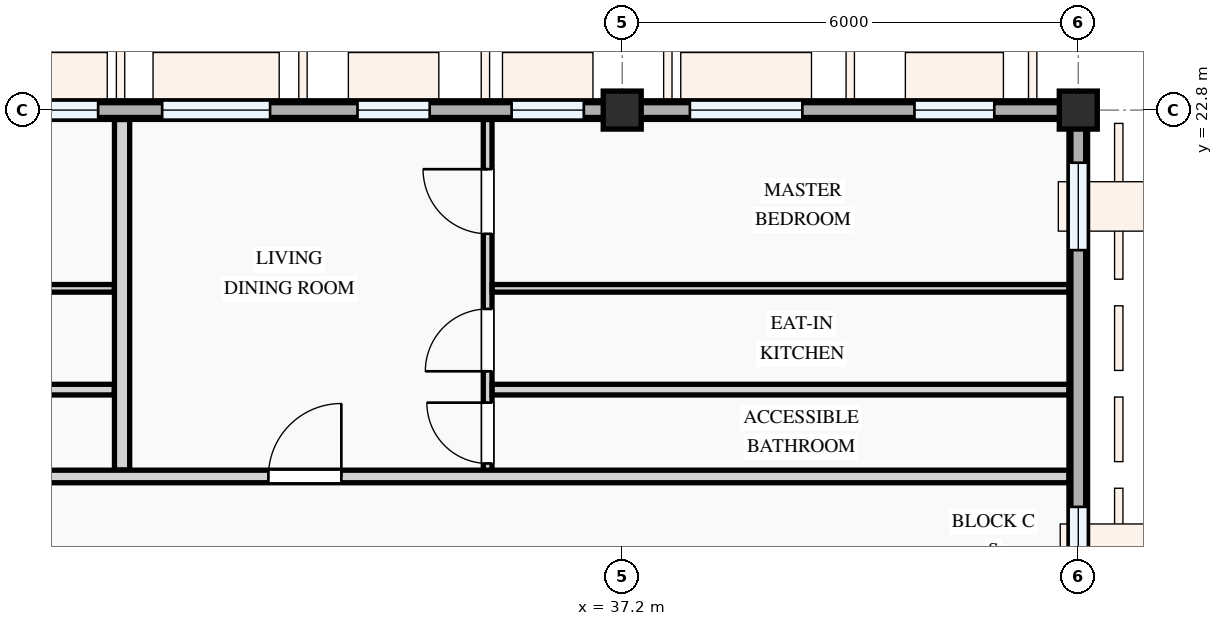
"""IFC4 building model, lengths in metres.
Left out: names, types, materials, properties, quantities, classifications, styles, units other than length and angle.
Written with IfcOpenShell. Run it as: python <this file> out.ifc"""

import sys

from ifc_helpers import new_model, si_unit, direction, frame, frame_2d, origin, origin_2d, place, context, subcontext, project, spatial, rectangle, extrude, element, fill, save


model = new_model("IFC4")
c1 = context("Model", 3, precision=1e-05, world=origin(), true_north=direction((0.0, 1.0)))
c2 = subcontext(c1, "Body", "Model", "MODEL_VIEW")
j1 = project(units=[si_unit("LENGTHUNIT", "METRE"), si_unit("PLANEANGLEUNIT", "RADIAN")], contexts=[c1])
p1 = place(None, origin())
s1 = spatial("IfcSite", under=j1, at=p1, CompositionType="ELEMENT")
p2 = place(p1, origin())
s2 = spatial("IfcBuilding", under=s1, at=p2, CompositionType="ELEMENT")
p3 = place(p2, frame((0.0, 0.0, 34.5)))
s3 = spatial("IfcBuildingStorey", under=s2, at=p3, CompositionType="ELEMENT", Elevation=34.5)
for number, where, z_axis, x_axis in (
    (1, (37.2, 22.8, 0.0), (0.0, 0.0, 1.0), (1.0, 0.0, 0.0)),
    (2, (43.2, 22.8, 0.0), (0.0, 0.0, 1.0), (1.0, 0.0, 0.0)),
):
    element("IfcColumn", number, at=place(p3, frame(where, z_axis=z_axis, x_axis=x_axis)), inside=s3, PredefinedType="COLUMN", context=c2, shape_type="SweptSolid", body=[
        extrude(rectangle(XDim=0.5, YDim=0.5, at=origin_2d()), origin(), (0.0, 0.0, 1.0), 3.3),
    ])
p4 = place(p3, frame((43.2, 14.4, 0.0), z_axis=(0.0, 0.0, 1.0), x_axis=(0.0, 1.0, 0.0)))
e3 = element("IfcWall", 3, at=p4, inside=s3, PredefinedType="STANDARD", context=c2, shape_type="SweptSolid", body=[
    extrude(rectangle(XDim=8.4, YDim=0.245, at=frame_2d((4.2, 0.0))), origin(), (0.0, 0.0, 1.0), 2.425),
])
p5 = place(p4, frame((0.485, 0.0, 0.78)))
e4 = element("IfcOpeningElement", 4, at=p5, cuts=e3, PredefinedType="OPENING", context=c2, shape_type="SweptSolid", body=[
    extrude(rectangle(XDim=0.9, YDim=1.2, at=frame_2d((0.45, 0.6))), frame((0.0, 0.133, 0.0), z_axis=(0.0, -1.0, 0.0), x_axis=(1.0, 0.0, 0.0)), (0.0, 0.0, 1.0), 0.265),
])
p6 = place(p4, frame((2.08, 0.0, 0.78)))
e5 = element("IfcOpeningElement", 5, at=p6, cuts=e3, PredefinedType="OPENING", context=c2, shape_type="SweptSolid", body=[
    extrude(rectangle(XDim=1.1, YDim=1.3, at=frame_2d((0.55, 0.65))), frame((0.0, 0.133, 0.0), z_axis=(0.0, -1.0, 0.0), x_axis=(1.0, 0.0, 0.0)), (0.0, 0.0, 1.0), 0.265),
])
p7 = place(p4, frame((6.558, 0.0, 0.78)))
e6 = element("IfcOpeningElement", 6, at=p7, cuts=e3, PredefinedType="OPENING", context=c2, shape_type="SweptSolid", body=[
    extrude(rectangle(XDim=1.15, YDim=1.25, at=frame_2d((0.575, 0.625))), frame((0.0, 0.133, 0.0), z_axis=(0.0, -1.0, 0.0), x_axis=(1.0, 0.0, 0.0)), (0.0, 0.0, 1.0), 0.265),
])
p8 = place(p3, frame((43.2, 22.8, 0.0), z_axis=(0.0, 0.0, 1.0), x_axis=(-1.0, 0.0, 0.0)))
e7 = element("IfcWall", 7, at=p8, inside=s3, PredefinedType="STANDARD", context=c2, shape_type="SweptSolid", body=[
    extrude(rectangle(XDim=6.0, YDim=0.245, at=frame_2d((3.0, 0.0))), origin(), (0.0, 0.0, 1.0), 2.525),
])
p9 = place(p8, frame((1.105, 0.0, 0.78)))
e8 = element("IfcOpeningElement", 8, at=p9, cuts=e7, PredefinedType="OPENING", context=c2, shape_type="SweptSolid", body=[
    extrude(rectangle(XDim=1.05, YDim=1.2, at=frame_2d((0.525, 0.6))), frame((0.0, 0.133, 0.0), z_axis=(0.0, -1.0, 0.0), x_axis=(1.0, 0.0, 0.0)), (0.0, 0.0, 1.0), 0.265),
])
p10 = place(p8, frame((3.63, 0.0, 0.78)))
e9 = element("IfcOpeningElement", 9, at=p10, cuts=e7, PredefinedType="OPENING", context=c2, shape_type="SweptSolid", body=[
    extrude(rectangle(XDim=1.48, YDim=1.52, at=frame_2d((0.74, 0.76))), frame((0.0, 0.133, 0.0), z_axis=(0.0, -1.0, 0.0), x_axis=(1.0, 0.0, 0.0)), (0.0, 0.0, 1.0), 0.265),
])
p11 = place(p3, frame((37.2, 22.8, 0.0), z_axis=(0.0, 0.0, 1.0), x_axis=(-1.0, 0.0, 0.0)))
e10 = element("IfcWall", 10, at=p11, inside=s3, PredefinedType="STANDARD", context=c2, shape_type="SweptSolid", body=[
    extrude(rectangle(XDim=8.4, YDim=0.245, at=frame_2d((4.2, 0.0))), origin(), (0.0, 0.0, 1.0), 2.375),
])
p12 = place(p11, frame((0.505, 0.0, 0.78)))
e11 = element("IfcOpeningElement", 11, at=p12, cuts=e10, PredefinedType="OPENING", context=c2, shape_type="SweptSolid", body=[
    extrude(rectangle(XDim=0.95, YDim=1.15, at=frame_2d((0.475, 0.575))), frame((0.0, 0.133, 0.0), z_axis=(0.0, -1.0, 0.0), x_axis=(1.0, 0.0, 0.0)), (0.0, 0.0, 1.0), 0.265),
])
p13 = place(p11, frame((2.533, 0.0, 0.78)))
e12 = element("IfcOpeningElement", 12, at=p13, cuts=e10, PredefinedType="OPENING", context=c2, shape_type="SweptSolid", body=[
    extrude(rectangle(XDim=0.95, YDim=1.15, at=frame_2d((0.475, 0.575))), frame((0.0, 0.133, 0.0), z_axis=(0.0, -1.0, 0.0), x_axis=(1.0, 0.0, 0.0)), (0.0, 0.0, 1.0), 0.265),
])
p14 = place(p11, frame((4.633, 0.0, 0.78)))
e13 = element("IfcOpeningElement", 13, at=p14, cuts=e10, PredefinedType="OPENING", context=c2, shape_type="SweptSolid", body=[
    extrude(rectangle(XDim=1.42, YDim=1.38, at=frame_2d((0.71, 0.69))), frame((0.0, 0.133, 0.0), z_axis=(0.0, -1.0, 0.0), x_axis=(1.0, 0.0, 0.0)), (0.0, 0.0, 1.0), 0.265),
])
p15 = place(p11, frame((6.895, 0.0, 0.78)))
e14 = element("IfcOpeningElement", 14, at=p15, cuts=e10, PredefinedType="OPENING", context=c2, shape_type="SweptSolid", body=[
    extrude(rectangle(XDim=1.0, YDim=1.25, at=frame_2d((0.5, 0.625))), frame((0.0, 0.133, 0.0), z_axis=(0.0, -1.0, 0.0), x_axis=(1.0, 0.0, 0.0)), (0.0, 0.0, 1.0), 0.265),
])
p16 = place(p3, frame((43.2, 8.4, 3.3), z_axis=(0.0, 0.0, 1.0), x_axis=(0.0, 1.0, 0.0)))
e15 = element("IfcWall", 15, at=p16, inside=s3, PredefinedType="PARAPET", context=c2, shape_type="SweptSolid", body=[
    extrude(rectangle(XDim=14.4, YDim=0.195, at=frame_2d((7.2, 0.0))), origin(), (0.0, 0.0, 1.0), 1.15),
])
p17 = place(p3, frame((43.2, 22.8, 3.3), z_axis=(0.0, 0.0, 1.0), x_axis=(-1.0, 0.0, 0.0)))
e16 = element("IfcWall", 16, at=p17, inside=s3, PredefinedType="PARAPET", context=c2, shape_type="SweptSolid", body=[
    extrude(rectangle(XDim=20.4, YDim=0.195, at=frame_2d((10.2, 0.0))), origin(), (0.0, 0.0, 1.0), 1.15),
])
p18 = place(p3, frame((26.54, 20.455, 0.0), z_axis=(0.0, 0.0, 1.0), x_axis=(1.0, 0.0, 0.0)))
e17 = element("IfcWall", 17, at=p18, inside=s3, PredefinedType="PARTITIONING", context=c2, shape_type="SweptSolid", body=[
    extrude(rectangle(XDim=3.978, YDim=0.1, at=frame_2d((1.989, 0.0))), origin(), (0.0, 0.0, 1.0), 3.0),
])
p19 = place(p3, frame((26.54, 19.122, 0.0), z_axis=(0.0, 0.0, 1.0), x_axis=(1.0, 0.0, 0.0)))
e18 = element("IfcWall", 18, at=p19, inside=s3, PredefinedType="PARTITIONING", context=c2, shape_type="SweptSolid", body=[
    extrude(rectangle(XDim=3.978, YDim=0.14, at=frame_2d((1.989, 0.0))), origin(), (0.0, 0.0, 1.0), 3.0),
])
p20 = place(p3, frame((35.43, 17.98, 0.0), z_axis=(0.0, 0.0, 1.0), x_axis=(0.0, 1.0, 0.0)))
e19 = element("IfcWall", 19, at=p20, inside=s3, PredefinedType="PARTITIONING", context=c2, shape_type="SweptSolid", body=[
    extrude(rectangle(XDim=4.696, YDim=0.115, at=frame_2d((2.348, 0.0))), origin(), (0.0, 0.0, 1.0), 3.0),
])
p21 = place(p20, frame((0.171, 0.0, 0.0)))
e20 = element("IfcOpeningElement", 20, at=p21, cuts=e19, PredefinedType="OPENING", context=c2, shape_type="SweptSolid", body=[
    extrude(rectangle(XDim=0.8, YDim=2.1, at=frame_2d((0.4, 1.05))), frame((0.0, 0.067, 0.0), z_axis=(0.0, -1.0, 0.0), x_axis=(1.0, 0.0, 0.0)), (0.0, 0.0, 1.0), 0.135),
])
p22 = place(p20, frame((1.384, 0.0, 0.0)))
e21 = element("IfcOpeningElement", 21, at=p22, cuts=e19, PredefinedType="OPENING", context=c2, shape_type="SweptSolid", body=[
    extrude(rectangle(XDim=0.82, YDim=2.08, at=frame_2d((0.41, 1.04))), frame((0.0, 0.067, 0.0), z_axis=(0.0, -1.0, 0.0), x_axis=(1.0, 0.0, 0.0)), (0.0, 0.0, 1.0), 0.135),
])
p23 = place(p20, frame((3.193, 0.0, 0.0)))
e22 = element("IfcOpeningElement", 22, at=p23, cuts=e19, PredefinedType="OPENING", context=c2, shape_type="SweptSolid", body=[
    extrude(rectangle(XDim=0.85, YDim=2.1, at=frame_2d((0.425, 1.05))), frame((0.0, 0.067, 0.0), z_axis=(0.0, -1.0, 0.0), x_axis=(1.0, 0.0, 0.0)), (0.0, 0.0, 1.0), 0.135),
])
p24 = place(p3, frame((35.489, 20.455, 0.0), z_axis=(0.0, 0.0, 1.0), x_axis=(1.0, 0.0, 0.0)))
e23 = element("IfcWall", 23, at=p24, inside=s3, PredefinedType="PARTITIONING", context=c2, shape_type="SweptSolid", body=[
    extrude(rectangle(XDim=7.586, YDim=0.1, at=frame_2d((3.793, 0.0))), origin(), (0.0, 0.0, 1.0), 3.0),
])
p25 = place(p3, frame((35.489, 19.122, 0.0), z_axis=(0.0, 0.0, 1.0), x_axis=(1.0, 0.0, 0.0)))
e24 = element("IfcWall", 24, at=p25, inside=s3, PredefinedType="PARTITIONING", context=c2, shape_type="SweptSolid", body=[
    extrude(rectangle(XDim=7.586, YDim=0.14, at=frame_2d((3.793, 0.0))), origin(), (0.0, 0.0, 1.0), 3.0),
])
p26 = place(p3, frame((30.62, 18.064, 0.0), z_axis=(0.0, 0.0, 1.0), x_axis=(0.0, 1.0, 0.0)))
e25 = element("IfcWall", 25, at=p26, inside=s3, PredefinedType="PARTITIONING", context=c2, shape_type="SweptSolid", body=[
    extrude(rectangle(XDim=4.611, YDim=0.2, at=frame_2d((2.306, 0.0))), origin(), (0.0, 0.0, 1.0), 3.0),
])
p27 = place(p3, frame((22.66, 17.98, 0.0), z_axis=(0.0, 0.0, 1.0), x_axis=(1.0, 0.0, 0.0)))
e26 = element("IfcWall", 26, at=p27, inside=s3, PredefinedType="PARTITIONING", context=c2, shape_type="SweptSolid", body=[
    extrude(rectangle(XDim=20.416, YDim=0.165, at=frame_2d((10.208, 0.0))), origin(), (0.0, 0.0, 1.0), 3.0),
])
p28 = place(p27, frame((2.611, 0.0, 0.0)))
e27 = element("IfcOpeningElement", 27, at=p28, cuts=e26, PredefinedType="OPENING", context=c2, shape_type="SweptSolid", body=[
    extrude(rectangle(XDim=0.92, YDim=2.1, at=frame_2d((0.46, 1.05))), frame((0.0, 0.093, 0.0), z_axis=(0.0, -1.0, 0.0), x_axis=(1.0, 0.0, 0.0)), (0.0, 0.0, 1.0), 0.185),
])
p29 = place(p27, frame((9.885, 0.0, 0.0)))
e28 = element("IfcOpeningElement", 28, at=p29, cuts=e26, PredefinedType="OPENING", context=c2, shape_type="SweptSolid", body=[
    extrude(rectangle(XDim=0.96, YDim=2.12, at=frame_2d((0.48, 1.06))), frame((0.0, 0.093, 0.0), z_axis=(0.0, -1.0, 0.0), x_axis=(1.0, 0.0, 0.0)), (0.0, 0.0, 1.0), 0.185),
])
p30 = place(p6, origin())
e29 = element("IfcWindow", 29, at=p30, inside=s3, PartitioningType="SINGLE_PANEL", PredefinedType="WINDOW", context=c2, shape_type="SweptSolid", body=[
    extrude(rectangle(XDim=1.1, YDim=1.3, at=frame_2d((0.55, 0.65))), frame((0.0, 0.03, 0.0), z_axis=(0.0, -1.0, 0.0), x_axis=(1.0, 0.0, 0.0)), (0.0, 0.0, 1.0), 0.06),
])
fill(e5, e29)
p31 = place(p7, origin())
e30 = element("IfcWindow", 30, at=p31, inside=s3, PartitioningType="SINGLE_PANEL", PredefinedType="WINDOW", context=c2, shape_type="SweptSolid", body=[
    extrude(rectangle(XDim=1.15, YDim=1.25, at=frame_2d((0.575, 0.625))), frame((0.0, 0.03, 0.0), z_axis=(0.0, -1.0, 0.0), x_axis=(1.0, 0.0, 0.0)), (0.0, 0.0, 1.0), 0.06),
])
fill(e6, e30)
p32 = place(p9, origin())
e31 = element("IfcWindow", 31, at=p32, inside=s3, PartitioningType="SINGLE_PANEL", PredefinedType="WINDOW", context=c2, shape_type="SweptSolid", body=[
    extrude(rectangle(XDim=1.05, YDim=1.2, at=frame_2d((0.525, 0.6))), frame((0.0, 0.03, 0.0), z_axis=(0.0, -1.0, 0.0), x_axis=(1.0, 0.0, 0.0)), (0.0, 0.0, 1.0), 0.06),
])
fill(e8, e31)
p33 = place(p10, origin())
e32 = element("IfcWindow", 32, at=p33, inside=s3, PartitioningType="SINGLE_PANEL", PredefinedType="WINDOW", context=c2, shape_type="SweptSolid", body=[
    extrude(rectangle(XDim=1.48, YDim=1.52, at=frame_2d((0.74, 0.76))), frame((0.0, 0.03, 0.0), z_axis=(0.0, -1.0, 0.0), x_axis=(1.0, 0.0, 0.0)), (0.0, 0.0, 1.0), 0.06),
])
fill(e9, e32)
p34 = place(p12, origin())
e33 = element("IfcWindow", 33, at=p34, inside=s3, PartitioningType="SINGLE_PANEL", PredefinedType="WINDOW", context=c2, shape_type="SweptSolid", body=[
    extrude(rectangle(XDim=0.95, YDim=1.15, at=frame_2d((0.475, 0.575))), frame((0.0, 0.03, 0.0), z_axis=(0.0, -1.0, 0.0), x_axis=(1.0, 0.0, 0.0)), (0.0, 0.0, 1.0), 0.06),
])
fill(e11, e33)
p35 = place(p13, origin())
e34 = element("IfcWindow", 34, at=p35, inside=s3, PartitioningType="SINGLE_PANEL", PredefinedType="WINDOW", context=c2, shape_type="SweptSolid", body=[
    extrude(rectangle(XDim=0.95, YDim=1.15, at=frame_2d((0.475, 0.575))), frame((0.0, 0.03, 0.0), z_axis=(0.0, -1.0, 0.0), x_axis=(1.0, 0.0, 0.0)), (0.0, 0.0, 1.0), 0.06),
])
fill(e12, e34)
p36 = place(p14, origin())
e35 = element("IfcWindow", 35, at=p36, inside=s3, PartitioningType="SINGLE_PANEL", PredefinedType="WINDOW", context=c2, shape_type="SweptSolid", body=[
    extrude(rectangle(XDim=1.42, YDim=1.38, at=frame_2d((0.71, 0.69))), frame((0.0, 0.03, 0.0), z_axis=(0.0, -1.0, 0.0), x_axis=(1.0, 0.0, 0.0)), (0.0, 0.0, 1.0), 0.06),
])
fill(e13, e35)
p37 = place(p15, origin())
e36 = element("IfcWindow", 36, at=p37, inside=s3, PartitioningType="SINGLE_PANEL", PredefinedType="WINDOW", context=c2, shape_type="SweptSolid", body=[
    extrude(rectangle(XDim=1.0, YDim=1.25, at=frame_2d((0.5, 0.625))), frame((0.0, 0.03, 0.0), z_axis=(0.0, -1.0, 0.0), x_axis=(1.0, 0.0, 0.0)), (0.0, 0.0, 1.0), 0.06),
])
fill(e14, e36)
p38 = place(p21, origin())
e37 = element("IfcDoor", 37, at=p38, inside=s3, OperationType="SINGLE_SWING_RIGHT", PredefinedType="DOOR", context=c2, shape_type="SweptSolid", body=[
    extrude(rectangle(XDim=0.8, YDim=2.1, at=frame_2d((0.4, 1.05))), frame((0.0, 0.025, 0.0), z_axis=(0.0, -1.0, 0.0), x_axis=(1.0, 0.0, 0.0)), (0.0, 0.0, 1.0), 0.05),
])
fill(e20, e37)
p39 = place(p22, origin())
e38 = element("IfcDoor", 38, at=p39, inside=s3, OperationType="SINGLE_SWING_LEFT", PredefinedType="DOOR", context=c2, shape_type="SweptSolid", body=[
    extrude(rectangle(XDim=0.82, YDim=2.08, at=frame_2d((0.41, 1.04))), frame((0.0, 0.025, 0.0), z_axis=(0.0, -1.0, 0.0), x_axis=(1.0, 0.0, 0.0)), (0.0, 0.0, 1.0), 0.05),
])
fill(e21, e38)
p40 = place(p23, origin())
e39 = element("IfcDoor", 39, at=p40, inside=s3, OperationType="SINGLE_SWING_RIGHT", PredefinedType="DOOR", context=c2, shape_type="SweptSolid", body=[
    extrude(rectangle(XDim=0.85, YDim=2.1, at=frame_2d((0.425, 1.05))), frame((0.0, 0.025, 0.0), z_axis=(0.0, -1.0, 0.0), x_axis=(1.0, 0.0, 0.0)), (0.0, 0.0, 1.0), 0.05),
])
fill(e22, e39)
p41 = place(p29, origin())
e40 = element("IfcDoor", 40, at=p41, inside=s3, OperationType="SINGLE_SWING_RIGHT", PredefinedType="DOOR", context=c2, shape_type="SweptSolid", body=[
    extrude(rectangle(XDim=0.96, YDim=2.12, at=frame_2d((0.48, 1.06))), frame((0.0, 0.025, 0.0), z_axis=(0.0, -1.0, 0.0), x_axis=(1.0, 0.0, 0.0)), (0.0, 0.0, 1.0), 0.05),
])
fill(e28, e40)
save(model, sys.argv[1])
